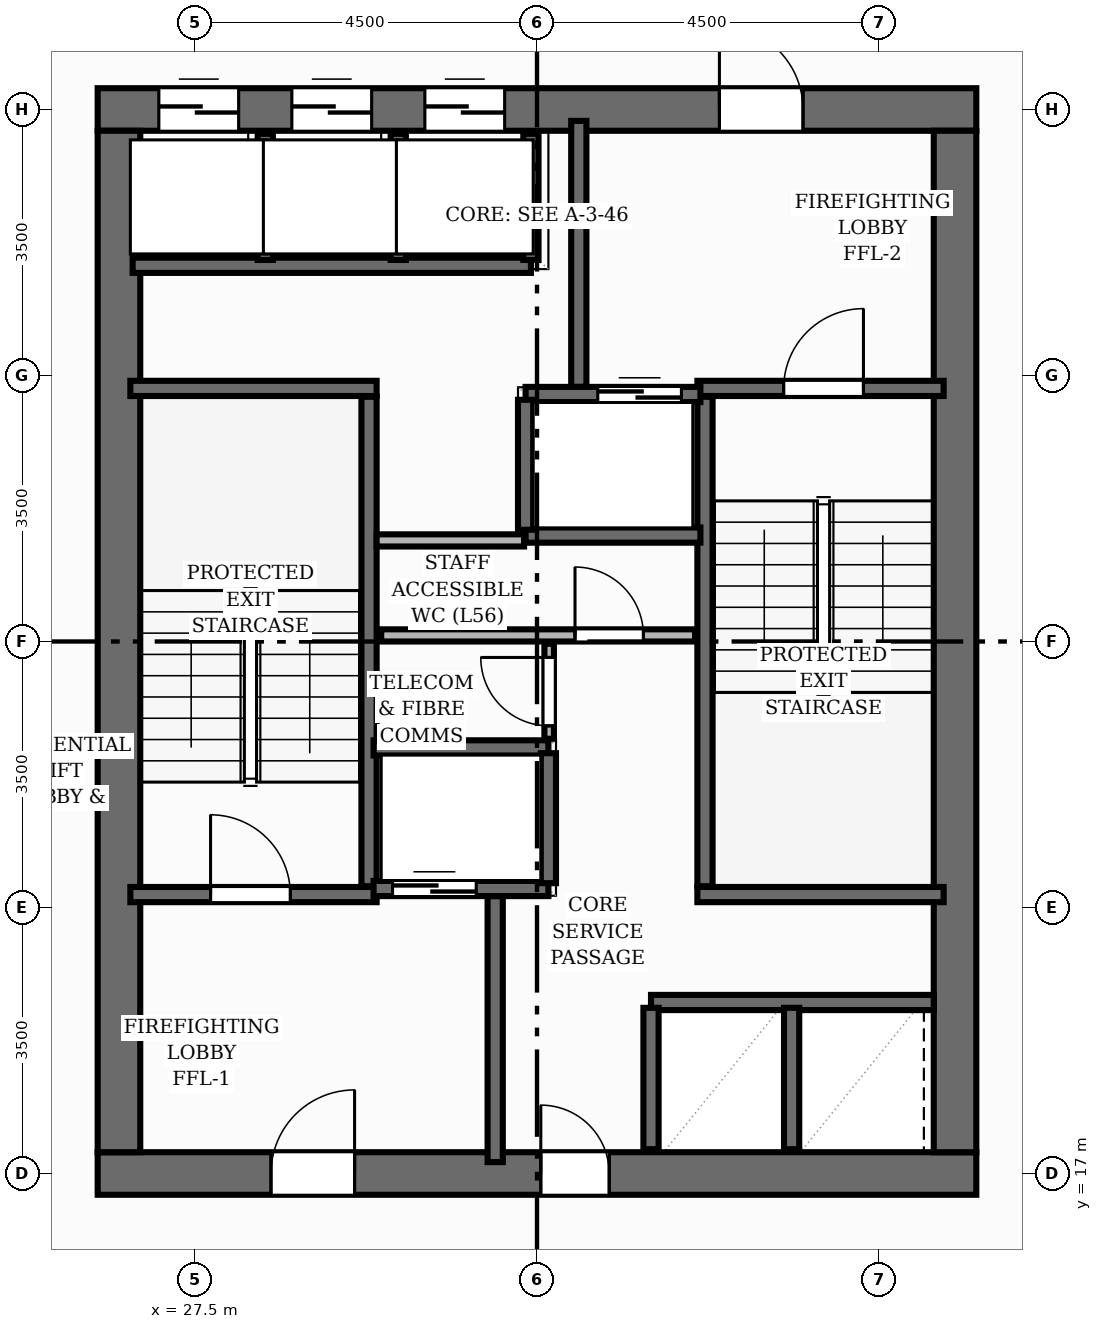
"""IFC4 building model, lengths in metres.
Left out: names, types, materials, properties, quantities, classifications, styles, units other than length and angle.
Written with IfcOpenShell. Run it as: python <this file> out.ifc"""

import sys

from ifc_helpers import new_model, si_unit, direction, frame, frame_2d, origin, place, context, subcontext, project, spatial, rectangle, extrude, element, fill, save


model = new_model("IFC4")
c1 = context("Model", 3, precision=1e-05, world=origin(), true_north=direction((0.0, 1.0)))
c2 = subcontext(c1, "Body", "Model", "MODEL_VIEW")
j1 = project(units=[si_unit("LENGTHUNIT", "METRE"), si_unit("PLANEANGLEUNIT", "RADIAN")], contexts=[c1])
p1 = place(None, origin())
s1 = spatial("IfcSite", under=j1, at=p1, CompositionType="ELEMENT")
p2 = place(p1, origin())
s2 = spatial("IfcBuilding", under=s1, at=p2, CompositionType="ELEMENT")
p3 = place(p2, frame((0.0, 0.0, 188.64)))
s3 = spatial("IfcBuildingStorey", under=s2, at=p3, CompositionType="ELEMENT", Elevation=188.64)
p4 = place(p3, frame((26.22, 17.0, 0.0), z_axis=(0.0, 0.0, 1.0), x_axis=(1.0, 0.0, 0.0)))
e1 = element("IfcWall", 1, at=p4, inside=s3, PredefinedType="SHEAR", context=c2, shape_type="SweptSolid", body=[
    extrude(rectangle(XDim=11.56, YDim=0.56, at=frame_2d((5.78, 0.0))), origin(), (0.0, 0.0, 1.0), 3.2),
])
p5 = place(p4, frame((2.28, 0.0, 0.0)))
e2 = element("IfcOpeningElement", 2, at=p5, cuts=e1, PredefinedType="OPENING", context=c2, shape_type="SweptSolid", body=[
    extrude(rectangle(XDim=1.1, YDim=2.15, at=frame_2d((0.55, 1.075))), frame((0.0, 0.29, 0.0), z_axis=(0.0, -1.0, 0.0), x_axis=(1.0, 0.0, 0.0)), (0.0, 0.0, 1.0), 0.58),
])
p6 = place(p4, frame((5.83, 0.0, 0.0)))
e3 = element("IfcOpeningElement", 3, at=p6, cuts=e1, PredefinedType="OPENING", context=c2, shape_type="SweptSolid", body=[
    extrude(rectangle(XDim=0.9, YDim=2.1, at=frame_2d((0.45, 1.05))), frame((0.0, 0.29, 0.0), z_axis=(0.0, -1.0, 0.0), x_axis=(1.0, 0.0, 0.0)), (0.0, 0.0, 1.0), 0.58),
])
p7 = place(p3, frame((26.22, 31.0, 0.0), z_axis=(0.0, 0.0, 1.0), x_axis=(1.0, 0.0, 0.0)))
e4 = element("IfcWall", 4, at=p7, inside=s3, PredefinedType="SHEAR", context=c2, shape_type="SweptSolid", body=[
    extrude(rectangle(XDim=11.56, YDim=0.56, at=frame_2d((5.78, 0.0))), origin(), (0.0, 0.0, 1.0), 3.2),
])
p8 = place(p7, frame((8.18, 0.0, 0.0)))
e5 = element("IfcOpeningElement", 5, at=p8, cuts=e4, PredefinedType="OPENING", context=c2, shape_type="SweptSolid", body=[
    extrude(rectangle(XDim=1.1, YDim=2.15, at=frame_2d((0.55, 1.075))), frame((0.0, 0.29, 0.0), z_axis=(0.0, -1.0, 0.0), x_axis=(1.0, 0.0, 0.0)), (0.0, 0.0, 1.0), 0.58),
])
p9 = place(p7, frame((0.805, 0.0, 0.0)))
e6 = element("IfcOpeningElement", 6, at=p9, cuts=e4, PredefinedType="OPENING", context=c2, shape_type="SweptSolid", body=[
    extrude(rectangle(XDim=1.05, YDim=2.15, at=frame_2d((0.525, 1.075))), frame((0.0, 0.29, 0.0), z_axis=(0.0, -1.0, 0.0), x_axis=(1.0, 0.0, 0.0)), (0.0, 0.0, 1.0), 0.58),
])
p10 = place(p7, frame((2.555, 0.0, 0.0)))
e7 = element("IfcOpeningElement", 7, at=p10, cuts=e4, PredefinedType="OPENING", context=c2, shape_type="SweptSolid", body=[
    extrude(rectangle(XDim=1.05, YDim=2.15, at=frame_2d((0.525, 1.075))), frame((0.0, 0.29, 0.0), z_axis=(0.0, -1.0, 0.0), x_axis=(1.0, 0.0, 0.0)), (0.0, 0.0, 1.0), 0.58),
])
p11 = place(p7, frame((4.305, 0.0, 0.0)))
e8 = element("IfcOpeningElement", 8, at=p11, cuts=e4, PredefinedType="OPENING", context=c2, shape_type="SweptSolid", body=[
    extrude(rectangle(XDim=1.05, YDim=2.15, at=frame_2d((0.525, 1.075))), frame((0.0, 0.29, 0.0), z_axis=(0.0, -1.0, 0.0), x_axis=(1.0, 0.0, 0.0)), (0.0, 0.0, 1.0), 0.58),
])
for number, where, z_axis, x_axis in (
    (9, (26.5, 17.28, 0.0), (0.0, 0.0, 1.0), (0.0, 1.0, 0.0)),
    (10, (37.5, 17.28, 0.0), (0.0, 0.0, 1.0), (0.0, 1.0, 0.0)),
):
    element("IfcWall", number, at=place(p3, frame(where, z_axis=z_axis, x_axis=x_axis)), inside=s3, PredefinedType="SHEAR", context=c2, shape_type="SweptSolid", body=[
        extrude(rectangle(XDim=13.44, YDim=0.56, at=frame_2d((6.72, 0.0))), origin(), (0.0, 0.0, 1.0), 3.2),
    ])
p12 = place(p3, frame((29.79, 20.78, 0.0), z_axis=(0.0, 0.0, 1.0), x_axis=(0.0, 1.0, 0.0)))
e11 = element("IfcWall", 11, at=p12, inside=s3, PredefinedType="SHEAR", context=c2, shape_type="SweptSolid", body=[
    extrude(rectangle(XDim=6.44, YDim=0.2, at=frame_2d((3.22, 0.0))), origin(), (0.0, 0.0, 1.0), 3.2),
])
p13 = place(p3, frame((26.65, 27.33, 0.0), z_axis=(0.0, 0.0, 1.0), x_axis=(1.0, 0.0, 0.0)))
e12 = element("IfcWall", 12, at=p13, inside=s3, PredefinedType="SHEAR", context=c2, shape_type="SweptSolid", body=[
    extrude(rectangle(XDim=3.24, YDim=0.2, at=frame_2d((1.62, 0.0))), origin(), (0.0, 0.0, 1.0), 3.2),
])
p14 = place(p3, frame((26.65, 20.67, 0.0), z_axis=(0.0, 0.0, 1.0), x_axis=(1.0, 0.0, 0.0)))
e13 = element("IfcWall", 13, at=p14, inside=s3, PredefinedType="SHEAR", context=c2, shape_type="SweptSolid", body=[
    extrude(rectangle(XDim=3.24, YDim=0.2, at=frame_2d((1.62, 0.0))), origin(), (0.0, 0.0, 1.0), 3.2),
])
p15 = place(p14, frame((1.055, 0.0, 0.0)))
e14 = element("IfcOpeningElement", 14, at=p15, cuts=e13, PredefinedType="OPENING", context=c2, shape_type="SweptSolid", body=[
    extrude(rectangle(XDim=1.05, YDim=2.15, at=frame_2d((0.525, 1.075))), frame((0.0, 0.11, 0.0), z_axis=(0.0, -1.0, 0.0), x_axis=(1.0, 0.0, 0.0)), (0.0, 0.0, 1.0), 0.22),
])
p16 = place(p3, frame((34.21, 20.78, 0.0), z_axis=(0.0, 0.0, 1.0), x_axis=(0.0, 1.0, 0.0)))
e15 = element("IfcWall", 15, at=p16, inside=s3, PredefinedType="SHEAR", context=c2, shape_type="SweptSolid", body=[
    extrude(rectangle(XDim=6.44, YDim=0.2, at=frame_2d((3.22, 0.0))), origin(), (0.0, 0.0, 1.0), 3.2),
])
p17 = place(p3, frame((34.11, 20.67, 0.0), z_axis=(0.0, 0.0, 1.0), x_axis=(1.0, 0.0, 0.0)))
e16 = element("IfcWall", 16, at=p17, inside=s3, PredefinedType="SHEAR", context=c2, shape_type="SweptSolid", body=[
    extrude(rectangle(XDim=3.24, YDim=0.2, at=frame_2d((1.62, 0.0))), origin(), (0.0, 0.0, 1.0), 3.2),
])
p18 = place(p3, frame((34.11, 27.33, 0.0), z_axis=(0.0, 0.0, 1.0), x_axis=(1.0, 0.0, 0.0)))
e17 = element("IfcWall", 17, at=p18, inside=s3, PredefinedType="SHEAR", context=c2, shape_type="SweptSolid", body=[
    extrude(rectangle(XDim=3.24, YDim=0.2, at=frame_2d((1.62, 0.0))), origin(), (0.0, 0.0, 1.0), 3.2),
])
p19 = place(p18, frame((1.135, 0.0, 0.0)))
e18 = element("IfcOpeningElement", 18, at=p19, cuts=e17, PredefinedType="OPENING", context=c2, shape_type="SweptSolid", body=[
    extrude(rectangle(XDim=1.05, YDim=2.15, at=frame_2d((0.525, 1.075))), frame((0.0, 0.11, 0.0), z_axis=(0.0, -1.0, 0.0), x_axis=(1.0, 0.0, 0.0)), (0.0, 0.0, 1.0), 0.22),
])
for number, where, z_axis, x_axis in (
    (19, (31.45, 17.15, 0.0), (0.0, 0.0, 1.0), (0.0, 1.0, 0.0)),
    (20, (32.55, 27.35, 0.0), (0.0, 0.0, 1.0), (0.0, 1.0, 0.0)),
):
    element("IfcWall", number, at=place(p3, frame(where, z_axis=z_axis, x_axis=x_axis)), inside=s3, PredefinedType="SHEAR", context=c2, shape_type="SweptSolid", body=[
        extrude(rectangle(XDim=3.5, YDim=0.2, at=frame_2d((1.75, 0.0))), origin(), (0.0, 0.0, 1.0), 3.2),
    ])
p20 = place(p3, frame((29.85, 20.75, 0.0), z_axis=(0.0, 0.0, 1.0), x_axis=(1.0, 0.0, 0.0)))
e21 = element("IfcWall", 21, at=p20, inside=s3, PredefinedType="SHEAR", context=c2, shape_type="SweptSolid", body=[
    extrude(rectangle(XDim=2.3, YDim=0.2, at=frame_2d((1.15, 0.0))), origin(), (0.0, 0.0, 1.0), 3.2),
])
p21 = place(p20, frame((0.25, 0.0, 0.0)))
e22 = element("IfcOpeningElement", 22, at=p21, cuts=e21, PredefinedType="OPENING", context=c2, shape_type="SweptSolid", body=[
    extrude(rectangle(XDim=1.1, YDim=2.15, at=frame_2d((0.55, 1.075))), frame((0.0, 0.11, 0.0), z_axis=(0.0, -1.0, 0.0), x_axis=(1.0, 0.0, 0.0)), (0.0, 0.0, 1.0), 0.22),
])
p22 = place(p3, frame((29.85, 22.6, 0.0), z_axis=(0.0, 0.0, 1.0), x_axis=(1.0, 0.0, 0.0)))
e23 = element("IfcWall", 23, at=p22, inside=s3, PredefinedType="SHEAR", context=c2, shape_type="SweptSolid", body=[
    extrude(rectangle(XDim=2.3, YDim=0.2, at=frame_2d((1.15, 0.0))), origin(), (0.0, 0.0, 1.0), 3.2),
])
p23 = place(p3, frame((32.15, 20.82, 0.0), z_axis=(0.0, 0.0, 1.0), x_axis=(0.0, 1.0, 0.0)))
e24 = element("IfcWall", 24, at=p23, inside=s3, PredefinedType="SHEAR", context=c2, shape_type="SweptSolid", body=[
    extrude(rectangle(XDim=1.71, YDim=0.2, at=frame_2d((0.855, 0.0))), origin(), (0.0, 0.0, 1.0), 3.2),
])
p24 = place(p3, frame((31.85, 27.25, 0.0), z_axis=(0.0, 0.0, 1.0), x_axis=(1.0, 0.0, 0.0)))
e25 = element("IfcWall", 25, at=p24, inside=s3, PredefinedType="SHEAR", context=c2, shape_type="SweptSolid", body=[
    extrude(rectangle(XDim=2.3, YDim=0.2, at=frame_2d((1.15, 0.0))), origin(), (0.0, 0.0, 1.0), 3.2),
])
p25 = place(p24, frame((0.95, 0.0, 0.0)))
e26 = element("IfcOpeningElement", 26, at=p25, cuts=e25, PredefinedType="OPENING", context=c2, shape_type="SweptSolid", body=[
    extrude(rectangle(XDim=1.1, YDim=2.15, at=frame_2d((0.55, 1.075))), frame((0.0, 0.11, 0.0), z_axis=(0.0, -1.0, 0.0), x_axis=(1.0, 0.0, 0.0)), (0.0, 0.0, 1.0), 0.22),
])
p26 = place(p3, frame((31.85, 25.4, 0.0), z_axis=(0.0, 0.0, 1.0), x_axis=(1.0, 0.0, 0.0)))
e27 = element("IfcWall", 27, at=p26, inside=s3, PredefinedType="SHEAR", context=c2, shape_type="SweptSolid", body=[
    extrude(rectangle(XDim=2.3, YDim=0.2, at=frame_2d((1.15, 0.0))), origin(), (0.0, 0.0, 1.0), 3.2),
])
p27 = place(p3, frame((31.85, 25.47, 0.0), z_axis=(0.0, 0.0, 1.0), x_axis=(0.0, 1.0, 0.0)))
e28 = element("IfcWall", 28, at=p27, inside=s3, PredefinedType="SHEAR", context=c2, shape_type="SweptSolid", body=[
    extrude(rectangle(XDim=1.71, YDim=0.2, at=frame_2d((0.855, 0.0))), origin(), (0.0, 0.0, 1.0), 3.2),
])
p28 = place(p3, frame((26.68, 28.95, 0.0), z_axis=(0.0, 0.0, 1.0), x_axis=(1.0, 0.0, 0.0)))
e29 = element("IfcWall", 29, at=p28, inside=s3, PredefinedType="SHEAR", context=c2, shape_type="SweptSolid", body=[
    extrude(rectangle(XDim=5.24, YDim=0.2, at=frame_2d((2.62, 0.0))), origin(), (0.0, 0.0, 1.0), 3.2),
])
for number, where, z_axis, x_axis in (
    (30, (31.92, 29.02, 0.0), (0.0, 0.0, 1.0), (0.0, 1.0, 0.0)),
    (31, (28.425, 29.02, 0.0), (0.0, 0.0, 1.0), (0.0, 1.0, 0.0)),
    (32, (30.175, 29.02, 0.0), (0.0, 0.0, 1.0), (0.0, 1.0, 0.0)),
):
    element("IfcWall", number, at=place(p3, frame(where, z_axis=z_axis, x_axis=x_axis)), inside=s3, PredefinedType="SHEAR", context=c2, shape_type="SweptSolid", body=[
        extrude(rectangle(XDim=1.66, YDim=0.2, at=frame_2d((0.83, 0.0))), origin(), (0.0, 0.0, 1.0), 3.2),
    ])
p29 = place(p3, frame((33.5, 19.25, 0.0), z_axis=(0.0, 0.0, 1.0), x_axis=(1.0, 0.0, 0.0)))
e33 = element("IfcWall", 33, at=p29, inside=s3, PredefinedType="SHEAR", context=c2, shape_type="SweptSolid", body=[
    extrude(rectangle(XDim=3.72, YDim=0.2, at=frame_2d((1.86, 0.0))), origin(), (0.0, 0.0, 1.0), 3.2),
])
for number, where, z_axis, x_axis in (
    (34, (33.5, 17.32, 0.0), (0.0, 0.0, 1.0), (0.0, 1.0, 0.0)),
    (35, (35.35, 17.32, 0.0), (0.0, 0.0, 1.0), (0.0, 1.0, 0.0)),
):
    element("IfcWall", number, at=place(p3, frame(where, z_axis=z_axis, x_axis=x_axis)), inside=s3, PredefinedType="SHEAR", context=c2, shape_type="SweptSolid", body=[
        extrude(rectangle(XDim=1.86, YDim=0.2, at=frame_2d((0.93, 0.0))), origin(), (0.0, 0.0, 1.0), 3.2),
    ])
p30 = place(p3, frame((29.95, 24.08, 0.0), z_axis=(0.0, 0.0, 1.0), x_axis=(1.0, 0.0, 0.0)))
e36 = element("IfcWall", 36, at=p30, inside=s3, PredefinedType="PLUMBINGWALL", context=c2, shape_type="SweptSolid", body=[
    extrude(rectangle(XDim=4.13, YDim=0.16, at=frame_2d((2.065, 0.0))), origin(), (0.0, 0.0, 1.0), 2.955),
])
p31 = place(p30, frame((2.55, 0.0, 0.0)))
e37 = element("IfcOpeningElement", 37, at=p31, cuts=e36, PredefinedType="OPENING", context=c2, shape_type="SweptSolid", body=[
    extrude(rectangle(XDim=0.9, YDim=2.1, at=frame_2d((0.45, 1.05))), frame((0.0, 0.09, 0.0), z_axis=(0.0, -1.0, 0.0), x_axis=(1.0, 0.0, 0.0)), (0.0, 0.0, 1.0), 0.18),
])
p32 = place(p3, frame((32.16, 22.72, 0.0), z_axis=(0.0, 0.0, 1.0), x_axis=(0.0, 1.0, 0.0)))
e38 = element("IfcWall", 38, at=p32, inside=s3, PredefinedType="PARTITIONING", context=c2, shape_type="SweptSolid", body=[
    extrude(rectangle(XDim=1.25, YDim=0.125, at=frame_2d((0.625, 0.0))), origin(), (0.0, 0.0, 1.0), 2.955),
])
p33 = place(p32, frame((0.17, 0.0, 0.0)))
e39 = element("IfcOpeningElement", 39, at=p33, cuts=e38, PredefinedType="OPENING", context=c2, shape_type="SweptSolid", body=[
    extrude(rectangle(XDim=0.9, YDim=2.1, at=frame_2d((0.45, 1.05))), frame((0.0, 0.073, 0.0), z_axis=(0.0, -1.0, 0.0), x_axis=(1.0, 0.0, 0.0)), (0.0, 0.0, 1.0), 0.145),
])
p34 = place(p3, frame((29.89, 25.33, 0.0), z_axis=(0.0, 0.0, 1.0), x_axis=(1.0, 0.0, 0.0)))
e40 = element("IfcWall", 40, at=p34, inside=s3, PredefinedType="PLUMBINGWALL", context=c2, shape_type="SweptSolid", body=[
    extrude(rectangle(XDim=1.94, YDim=0.16, at=frame_2d((0.97, 0.0))), origin(), (0.0, 0.0, 1.0), 2.955),
])
p35 = place(p15, origin())
e41 = element("IfcDoor", 41, at=p35, inside=s3, OperationType="SINGLE_SWING_LEFT", PredefinedType="DOOR", context=c2, shape_type="SweptSolid", body=[
    extrude(rectangle(XDim=1.05, YDim=2.15, at=frame_2d((0.525, 1.075))), frame((0.0, 0.025, 0.0), z_axis=(0.0, -1.0, 0.0), x_axis=(1.0, 0.0, 0.0)), (0.0, 0.0, 1.0), 0.05),
])
fill(e14, e41)
p36 = place(p19, origin())
e42 = element("IfcDoor", 42, at=p36, inside=s3, OperationType="SINGLE_SWING_RIGHT", PredefinedType="DOOR", context=c2, shape_type="SweptSolid", body=[
    extrude(rectangle(XDim=1.05, YDim=2.15, at=frame_2d((0.525, 1.075))), frame((0.0, 0.025, 0.0), z_axis=(0.0, -1.0, 0.0), x_axis=(1.0, 0.0, 0.0)), (0.0, 0.0, 1.0), 0.05),
])
fill(e18, e42)
p37 = place(p5, origin())
e43 = element("IfcDoor", 43, at=p37, inside=s3, OperationType="SINGLE_SWING_RIGHT", PredefinedType="DOOR", context=c2, shape_type="SweptSolid", body=[
    extrude(rectangle(XDim=1.1, YDim=2.15, at=frame_2d((0.55, 1.075))), frame((0.0, 0.025, 0.0), z_axis=(0.0, -1.0, 0.0), x_axis=(1.0, 0.0, 0.0)), (0.0, 0.0, 1.0), 0.05),
])
fill(e2, e43)
p38 = place(p8, origin())
e44 = element("IfcDoor", 44, at=p38, inside=s3, OperationType="SINGLE_SWING_LEFT", PredefinedType="DOOR", context=c2, shape_type="SweptSolid", body=[
    extrude(rectangle(XDim=1.1, YDim=2.15, at=frame_2d((0.55, 1.075))), frame((0.0, 0.025, 0.0), z_axis=(0.0, -1.0, 0.0), x_axis=(1.0, 0.0, 0.0)), (0.0, 0.0, 1.0), 0.05),
])
fill(e5, e44)
p39 = place(p21, origin())
e45 = element("IfcDoor", 45, at=p39, inside=s3, OperationType="DOUBLE_DOOR_SLIDING", PredefinedType="DOOR", context=c2, shape_type="SweptSolid", body=[
    extrude(rectangle(XDim=1.1, YDim=2.15, at=frame_2d((0.55, 1.075))), frame((0.0, 0.025, 0.0), z_axis=(0.0, -1.0, 0.0), x_axis=(1.0, 0.0, 0.0)), (0.0, 0.0, 1.0), 0.05),
])
fill(e22, e45)
p40 = place(p25, origin())
e46 = element("IfcDoor", 46, at=p40, inside=s3, OperationType="DOUBLE_DOOR_SLIDING", PredefinedType="DOOR", context=c2, shape_type="SweptSolid", body=[
    extrude(rectangle(XDim=1.1, YDim=2.15, at=frame_2d((0.55, 1.075))), frame((0.0, 0.025, 0.0), z_axis=(0.0, -1.0, 0.0), x_axis=(1.0, 0.0, 0.0)), (0.0, 0.0, 1.0), 0.05),
])
fill(e26, e46)
p41 = place(p9, origin())
e47 = element("IfcDoor", 47, at=p41, inside=s3, OperationType="DOUBLE_DOOR_SLIDING", PredefinedType="DOOR", context=c2, shape_type="SweptSolid", body=[
    extrude(rectangle(XDim=1.05, YDim=2.15, at=frame_2d((0.525, 1.075))), frame((0.0, 0.025, 0.0), z_axis=(0.0, -1.0, 0.0), x_axis=(1.0, 0.0, 0.0)), (0.0, 0.0, 1.0), 0.05),
])
fill(e6, e47)
p42 = place(p10, origin())
e48 = element("IfcDoor", 48, at=p42, inside=s3, OperationType="DOUBLE_DOOR_SLIDING", PredefinedType="DOOR", context=c2, shape_type="SweptSolid", body=[
    extrude(rectangle(XDim=1.05, YDim=2.15, at=frame_2d((0.525, 1.075))), frame((0.0, 0.025, 0.0), z_axis=(0.0, -1.0, 0.0), x_axis=(1.0, 0.0, 0.0)), (0.0, 0.0, 1.0), 0.05),
])
fill(e7, e48)
p43 = place(p11, origin())
e49 = element("IfcDoor", 49, at=p43, inside=s3, OperationType="DOUBLE_DOOR_SLIDING", PredefinedType="DOOR", context=c2, shape_type="SweptSolid", body=[
    extrude(rectangle(XDim=1.05, YDim=2.15, at=frame_2d((0.525, 1.075))), frame((0.0, 0.025, 0.0), z_axis=(0.0, -1.0, 0.0), x_axis=(1.0, 0.0, 0.0)), (0.0, 0.0, 1.0), 0.05),
])
fill(e8, e49)
p44 = place(p6, origin())
e50 = element("IfcDoor", 50, at=p44, inside=s3, OperationType="SINGLE_SWING_LEFT", PredefinedType="DOOR", context=c2, shape_type="SweptSolid", body=[
    extrude(rectangle(XDim=0.9, YDim=2.1, at=frame_2d((0.45, 1.05))), frame((0.0, 0.025, 0.0), z_axis=(0.0, -1.0, 0.0), x_axis=(1.0, 0.0, 0.0)), (0.0, 0.0, 1.0), 0.05),
])
fill(e3, e50)
p45 = place(p31, origin())
e51 = element("IfcDoor", 51, at=p45, inside=s3, OperationType="SINGLE_SWING_LEFT", PredefinedType="DOOR", context=c2, shape_type="SweptSolid", body=[
    extrude(rectangle(XDim=0.9, YDim=2.1, at=frame_2d((0.45, 1.05))), frame((0.0, 0.025, 0.0), z_axis=(0.0, -1.0, 0.0), x_axis=(1.0, 0.0, 0.0)), (0.0, 0.0, 1.0), 0.05),
])
fill(e37, e51)
p46 = place(p33, origin())
e52 = element("IfcDoor", 52, at=p46, inside=s3, OperationType="SINGLE_SWING_RIGHT", PredefinedType="DOOR", context=c2, shape_type="SweptSolid", body=[
    extrude(rectangle(XDim=0.9, YDim=2.1, at=frame_2d((0.45, 1.05))), frame((0.0, 0.025, 0.0), z_axis=(0.0, -1.0, 0.0), x_axis=(1.0, 0.0, 0.0)), (0.0, 0.0, 1.0), 0.05),
])
fill(e39, e52)
save(model, sys.argv[1])
